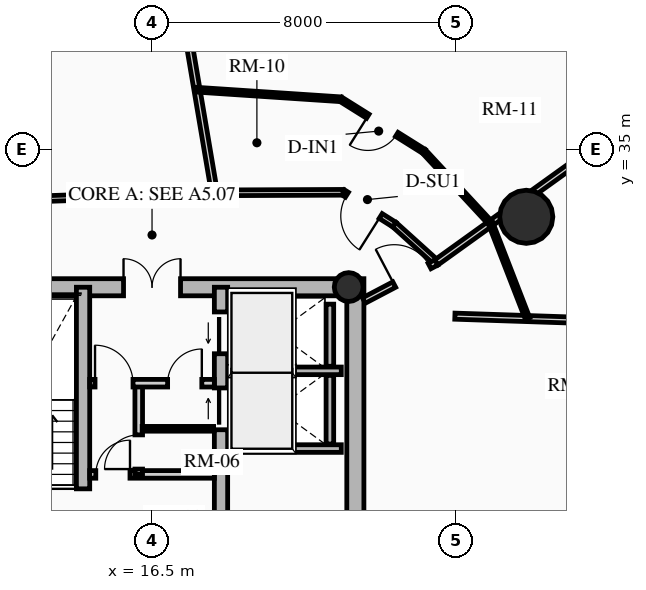
"""IFC4 building model, lengths in metres.
Left out: names, types, materials, properties, quantities, classifications, styles, units other than length and angle.
Written with IfcOpenShell. Run it as: python <this file> out.ifc"""

import sys

from ifc_helpers import new_model, si_unit, direction, frame, frame_2d, origin, origin_2d, place, context, subcontext, project, spatial, rectangle, circle, hollow_circle, extrude, source, transform, mapped, element, fill, save


model = new_model("IFC4")
c1 = context("Model", 3, precision=1e-05, world=origin(), true_north=direction((0.0, 1.0)))
c2 = subcontext(c1, "Body", "Model", "MODEL_VIEW")
j1 = project(units=[si_unit("LENGTHUNIT", "METRE"), si_unit("PLANEANGLEUNIT", "RADIAN")], contexts=[c1])
p1 = place(None, origin())
s1 = spatial("IfcSite", under=j1, at=p1, CompositionType="ELEMENT")
p2 = place(p1, origin())
s2 = spatial("IfcBuilding", under=s1, at=p2, CompositionType="ELEMENT")
p3 = place(p2, frame((0.0, 0.0, 110.89)))
s3 = spatial("IfcBuildingStorey", under=s2, at=p3, CompositionType="ELEMENT", Elevation=110.89)
p4 = place(p3, frame((21.85, 17.4, 0.0), z_axis=(0.0, 0.0, 1.0), x_axis=(0.0, 1.0, 0.0)))
e1 = element("IfcWall", 1, at=p4, inside=s3, PredefinedType="SHEAR", context=c2, shape_type="SweptSolid", body=[
    extrude(rectangle(XDim=14.2, YDim=0.45, at=frame_2d((7.1, 0.0))), origin(), (0.0, 0.0, 1.0), 2.91),
])
p5 = place(p3, frame((11.15, 31.375, 0.0), z_axis=(0.0, 0.0, 1.0), x_axis=(1.0, 0.0, 0.0)))
e2 = element("IfcWall", 2, at=p5, inside=s3, PredefinedType="SHEAR", context=c2, shape_type="SweptSolid", body=[
    extrude(rectangle(XDim=10.7, YDim=0.45, at=frame_2d((5.35, 0.0))), origin(), (0.0, 0.0, 1.0), 2.91),
])
m1 = source(origin(), c2, "Body", "SweptSolid", [
    extrude(rectangle(XDim=1.5, YDim=2.02, at=frame_2d((0.75, 1.01))), frame((0.0, 0.235, 0.0), z_axis=(0.0, -1.0, 0.0), x_axis=(1.0, 0.0, 0.0)), (0.0, 0.0, 1.0), 0.47),
])
p6 = place(p5, frame((4.6, 0.0, 0.0)))
e3 = element("IfcOpeningElement", 3, at=p6, cuts=e2, PredefinedType="OPENING", context=c2, shape_type="MappedRepresentation", body=[
    mapped(m1, transform((0.0, 0.0, 0.0), x_axis=(1.0, 0.0, 0.0), y_axis=(0.0, 1.0, 0.0), z_axis=(0.0, 0.0, 1.0), scale=1.0)),
])
p7 = place(p3, frame((14.685, 17.625, 0.0), z_axis=(0.0, 0.0, 1.0), x_axis=(0.0, 1.0, 0.0)))
e4 = element("IfcWall", 4, at=p7, inside=s3, PredefinedType="SHEAR", context=c2, shape_type="SweptSolid", body=[
    extrude(rectangle(XDim=13.75, YDim=0.35, at=frame_2d((6.875, 0.0))), origin(), (0.0, 0.0, 1.0), 2.91),
])
m2 = source(origin(), c2, "Body", "SweptSolid", [
    extrude(rectangle(XDim=1.1, YDim=2.015, at=frame_2d((0.55, 1.007))), frame((0.0, 0.185, 0.0), z_axis=(0.0, -1.0, 0.0), x_axis=(1.0, 0.0, 0.0)), (0.0, 0.0, 1.0), 0.37),
])
p8 = place(p7, frame((4.875, 0.0, 0.0)))
e5 = element("IfcOpeningElement", 5, at=p8, cuts=e4, PredefinedType="OPENING", context=c2, shape_type="MappedRepresentation", body=[
    mapped(m2, transform((0.0, 0.0, 0.0), x_axis=(1.0, 0.0, 0.0), y_axis=(0.0, 1.0, 0.0), z_axis=(0.0, 0.0, 1.0), scale=1.0)),
])
m3 = source(origin(), c2, "Body", "SweptSolid", [
    extrude(rectangle(XDim=1.15, YDim=2.02, at=frame_2d((0.575, 1.01))), frame((0.0, 0.185, 0.0), z_axis=(0.0, -1.0, 0.0), x_axis=(1.0, 0.0, 0.0)), (0.0, 0.0, 1.0), 0.37),
])
p9 = place(p7, frame((7.295, 0.0, 0.0)))
e6 = element("IfcOpeningElement", 6, at=p9, cuts=e4, PredefinedType="OPENING", context=c2, shape_type="MappedRepresentation", body=[
    mapped(m3, transform((0.0, 0.0, 0.0), x_axis=(1.0, 0.0, 0.0), y_axis=(0.0, 1.0, 0.0), z_axis=(0.0, 0.0, 1.0), scale=1.0)),
])
p10 = place(p3, frame((18.315, 17.625, 0.0), z_axis=(0.0, 0.0, 1.0), x_axis=(0.0, 1.0, 0.0)))
e7 = element("IfcWall", 7, at=p10, inside=s3, PredefinedType="SHEAR", context=c2, shape_type="SweptSolid", body=[
    extrude(rectangle(XDim=13.75, YDim=0.35, at=frame_2d((6.875, 0.0))), origin(), (0.0, 0.0, 1.0), 2.91),
])
p11 = place(p10, frame((10.0, 0.0, 0.0)))
e8 = element("IfcOpeningElement", 8, at=p11, cuts=e7, PredefinedType="OPENING", context=c2, shape_type="MappedRepresentation", body=[
    mapped(m2, transform((0.0, 0.0, 0.0), x_axis=(1.0, 0.0, 0.0), y_axis=(0.0, 1.0, 0.0), z_axis=(0.0, 0.0, 1.0), scale=1.0)),
])
p12 = place(p10, frame((12.0, 0.0, 0.0)))
e9 = element("IfcOpeningElement", 9, at=p12, cuts=e7, PredefinedType="OPENING", context=c2, shape_type="MappedRepresentation", body=[
    mapped(m2, transform((0.0, 0.0, 0.0), x_axis=(1.0, 0.0, 0.0), y_axis=(0.0, 1.0, 0.0), z_axis=(0.0, 0.0, 1.0), scale=1.0)),
])
p13 = place(p10, frame((5.305, 0.0, 0.0)))
e10 = element("IfcOpeningElement", 10, at=p13, cuts=e7, PredefinedType="OPENING", context=c2, shape_type="MappedRepresentation", body=[
    mapped(m3, transform((0.0, 0.0, 0.0), x_axis=(1.0, 0.0, 0.0), y_axis=(0.0, 1.0, 0.0), z_axis=(0.0, 0.0, 1.0), scale=1.0)),
])
p14 = place(p3, frame((21.675, 31.38, 0.0), z_axis=(0.0, 0.0, 1.0), x_axis=(1.0, 0.0, 0.0)))
e11 = element("IfcColumn", 11, at=p14, inside=s3, PredefinedType="COLUMN", context=c2, shape_type="SweptSolid", body=[
    extrude(hollow_circle(Radius=0.38, WallThickness=0.032, at=origin_2d()), origin(), (0.0, 0.0, 1.0), 2.91),
])
p15 = place(p3, frame((26.347, 33.229, 0.0), z_axis=(0.0, 0.0, 1.0), x_axis=(1.0, 0.0, 0.0)))
e12 = element("IfcColumn", 12, at=p15, inside=s3, PredefinedType="USERDEFINED", context=c2, shape_type="SweptSolid", body=[
    extrude(circle(Radius=0.7, at=origin_2d()), origin(), (0.0, 0.0, 1.0), 2.91),
])
p16 = place(p3, frame((25.658, 39.928, 0.0), z_axis=(0.0, 0.0, 1.0), x_axis=(0.632700781152, -0.77439635945, 0.0)))
e13 = element("IfcWall", 13, at=p16, inside=s3, PredefinedType="SOLIDWALL", context=c2, shape_type="SweptSolid", body=[
    extrude(rectangle(XDim=5.448, YDim=0.24, at=frame_2d((2.724, 0.0))), origin(), (0.0, 0.0, 1.0), 2.179),
])
m4 = source(origin(), c2, "Body", "SweptSolid", [
    extrude(rectangle(XDim=1.9, YDim=1.35, at=frame_2d((0.95, 0.675))), frame((0.0, 0.13, 0.0), z_axis=(0.0, -1.0, 0.0), x_axis=(1.0, 0.0, 0.0)), (0.0, 0.0, 1.0), 0.26),
])
p17 = place(p16, frame((1.774, 0.0, 0.65)))
e14 = element("IfcOpeningElement", 14, at=p17, cuts=e13, PredefinedType="OPENING", context=c2, shape_type="MappedRepresentation", body=[
    mapped(m4, transform((0.0, 0.0, 0.0), x_axis=(1.0, 0.0, 0.0), y_axis=(0.0, 1.0, 0.0), z_axis=(0.0, 0.0, 1.0), scale=1.0)),
])
for number, where, z_axis, x_axis in (
    (15, (18.51, 27.13, 0.0), (0.0, 0.0, 1.0), (1.0, 0.0, 0.0)),
    (16, (18.51, 29.175, 0.0), (0.0, 0.0, 1.0), (1.0, 0.0, 0.0)),
):
    element("IfcWall", number, at=place(p3, frame(where, z_axis=z_axis, x_axis=x_axis)), inside=s3, PredefinedType="SHEAR", context=c2, shape_type="SweptSolid", body=[
        extrude(rectangle(XDim=2.97, YDim=0.2, at=frame_2d((1.485, 0.0))), origin(), (0.0, 0.0, 1.0), 2.91),
    ])
p18 = place(p3, frame((21.18, 27.25, 0.0), z_axis=(0.0, 0.0, 1.0), x_axis=(0.0, 1.0, 0.0)))
e17 = element("IfcWall", 17, at=p18, inside=s3, PredefinedType="SHEAR", context=c2, shape_type="SweptSolid", body=[
    extrude(rectangle(XDim=1.805, YDim=0.2, at=frame_2d((0.902, 0.0))), origin(), (0.0, 0.0, 1.0), 2.91),
])
p19 = place(p3, frame((21.18, 29.295, 0.0), z_axis=(0.0, 0.0, 1.0), x_axis=(0.0, 1.0, 0.0)))
e18 = element("IfcWall", 18, at=p19, inside=s3, PredefinedType="SHEAR", context=c2, shape_type="SweptSolid", body=[
    extrude(rectangle(XDim=1.635, YDim=0.2, at=frame_2d((0.817, 0.0))), origin(), (0.0, 0.0, 1.0), 2.91),
])
p20 = place(p3, frame((14.86, 26.45, 0.0), z_axis=(0.0, 0.0, 1.0), x_axis=(1.0, 0.0, 0.0)))
e19 = element("IfcWall", 19, at=p20, inside=s3, PredefinedType="PARTITIONING", context=c2, shape_type="SweptSolid", body=[
    extrude(rectangle(XDim=3.28, YDim=0.2, at=frame_2d((1.64, 0.0))), origin(), (0.0, 0.0, 1.0), 2.655),
])
m5 = source(origin(), c2, "Body", "SweptSolid", [
    extrude(rectangle(XDim=0.9, YDim=2.005, at=frame_2d((0.45, 1.002))), frame((0.0, 0.11, 0.0), z_axis=(0.0, -1.0, 0.0), x_axis=(1.0, 0.0, 0.0)), (0.0, 0.0, 1.0), 0.22),
])
p21 = place(p20, frame((0.16, 0.0, 0.0)))
e20 = element("IfcOpeningElement", 20, at=p21, cuts=e19, PredefinedType="OPENING", context=c2, shape_type="MappedRepresentation", body=[
    mapped(m5, transform((0.0, 0.0, 0.0), x_axis=(1.0, 0.0, 0.0), y_axis=(0.0, 1.0, 0.0), z_axis=(0.0, 0.0, 1.0), scale=1.0)),
])
p22 = place(p3, frame((16.15, 26.45, 0.0), z_axis=(0.0, 0.0, 1.0), x_axis=(0.0, 1.0, 0.0)))
e21 = element("IfcWall", 21, at=p22, inside=s3, PredefinedType="PARTITIONING", context=c2, shape_type="SweptSolid", body=[
    extrude(rectangle(XDim=2.4, YDim=0.2, at=frame_2d((1.2, 0.0))), origin(), (0.0, 0.0, 1.0), 2.655),
])
p23 = place(p22, frame((0.14, 0.0, 0.0)))
e22 = element("IfcOpeningElement", 22, at=p23, cuts=e21, PredefinedType="OPENING", context=c2, shape_type="MappedRepresentation", body=[
    mapped(m5, transform((0.0, 0.0, 0.0), x_axis=(1.0, 0.0, 0.0), y_axis=(0.0, 1.0, 0.0), z_axis=(0.0, 0.0, 1.0), scale=1.0)),
])
p24 = place(p3, frame((14.86, 28.85, 0.0), z_axis=(0.0, 0.0, 1.0), x_axis=(1.0, 0.0, 0.0)))
e23 = element("IfcWall", 23, at=p24, inside=s3, PredefinedType="PARTITIONING", context=c2, shape_type="SweptSolid", body=[
    extrude(rectangle(XDim=3.28, YDim=0.2, at=frame_2d((1.64, 0.0))), origin(), (0.0, 0.0, 1.0), 2.655),
])
m6 = source(origin(), c2, "Body", "SweptSolid", [
    extrude(rectangle(XDim=1.0, YDim=2.015, at=frame_2d((0.5, 1.007))), frame((0.0, 0.11, 0.0), z_axis=(0.0, -1.0, 0.0), x_axis=(1.0, 0.0, 0.0)), (0.0, 0.0, 1.0), 0.22),
])
p25 = place(p24, frame((0.14, 0.0, 0.0)))
e24 = element("IfcOpeningElement", 24, at=p25, cuts=e23, PredefinedType="OPENING", context=c2, shape_type="MappedRepresentation", body=[
    mapped(m6, transform((0.0, 0.0, 0.0), x_axis=(1.0, 0.0, 0.0), y_axis=(0.0, 1.0, 0.0), z_axis=(0.0, 0.0, 1.0), scale=1.0)),
])
p26 = place(p24, frame((2.05, 0.0, 0.0)))
e25 = element("IfcOpeningElement", 25, at=p26, cuts=e23, PredefinedType="OPENING", context=c2, shape_type="MappedRepresentation", body=[
    mapped(m5, transform((0.0, 0.0, 0.0), x_axis=(1.0, 0.0, 0.0), y_axis=(0.0, 1.0, 0.0), z_axis=(0.0, 0.0, 1.0), scale=1.0)),
])
p27 = place(p3, frame((16.24, 27.65, 0.0), z_axis=(0.0, 0.0, 1.0), x_axis=(1.0, 0.0, 0.0)))
e26 = element("IfcWall", 26, at=p27, inside=s3, PredefinedType="PARTITIONING", context=c2, shape_type="SweptSolid", body=[
    extrude(rectangle(XDim=1.88, YDim=0.125, at=frame_2d((0.94, 0.0))), origin(), (0.0, 0.0, 1.0), 2.655),
])
p28 = place(p3, frame((23.98, 32.027, 0.0), z_axis=(0.0, 0.0, 1.0), x_axis=(-0.742353224332, 0.670008724065, 0.0)))
e27 = element("IfcWall", 27, at=p28, inside=s3, PredefinedType="PARTITIONING", context=c2, shape_type="SweptSolid", body=[
    extrude(rectangle(XDim=1.485, YDim=0.15, at=frame_2d((0.742, 0.0))), origin(), (0.0, 0.0, 1.0), 2.225),
])
p29 = place(p3, frame((22.877, 33.022, 0.0), z_axis=(0.0, 0.0, 1.0), x_axis=(-0.845895608855, 0.533348496689, 0.0)))
e28 = element("IfcWall", 28, at=p29, inside=s3, PredefinedType="PARTITIONING", context=c2, shape_type="SweptSolid", body=[
    extrude(rectangle(XDim=1.597, YDim=0.15, at=frame_2d((0.798, 0.0))), origin(), (0.0, 0.0, 1.0), 2.225),
])
m7 = source(origin(), c2, "Body", "SweptSolid", [
    extrude(rectangle(XDim=1.05, YDim=2.015, at=frame_2d((0.525, 1.007))), frame((0.0, 0.085, 0.0), z_axis=(0.0, -1.0, 0.0), x_axis=(1.0, 0.0, 0.0)), (0.0, 0.0, 1.0), 0.17),
])
p30 = place(p29, frame((0.427, 0.0, 0.0)))
e29 = element("IfcOpeningElement", 29, at=p30, cuts=e28, PredefinedType="OPENING", context=c2, shape_type="MappedRepresentation", body=[
    mapped(m7, transform((0.0, 0.0, 0.0), x_axis=(1.0, 0.0, 0.0), y_axis=(0.0, 1.0, 0.0), z_axis=(0.0, 0.0, 1.0), scale=1.0)),
])
p31 = place(p3, frame((21.527, 33.873, 0.0), z_axis=(0.0, 0.0, 1.0), x_axis=(-0.999991838845, -0.004040079574, 0.0)))
e30 = element("IfcWall", 30, at=p31, inside=s3, PredefinedType="PARTITIONING", context=c2, shape_type="SweptSolid", body=[
    extrude(rectangle(XDim=3.384, YDim=0.15, at=frame_2d((1.692, 0.0))), origin(), (0.0, 0.0, 1.0), 2.225),
])
p32 = place(p3, frame((18.143, 33.86, 0.0), z_axis=(0.0, 0.0, 1.0), x_axis=(-0.999419208319, -0.034077060363, 0.0)))
e31 = element("IfcWall", 31, at=p32, inside=s3, PredefinedType="PARTITIONING", context=c2, shape_type="SweptSolid", body=[
    extrude(rectangle(XDim=6.527, YDim=0.15, at=frame_2d((3.263, 0.0))), origin(), (0.0, 0.0, 1.0), 2.225),
])
p33 = place(p3, frame((24.469, 30.614, 0.0), z_axis=(0.0, 0.0, 1.0), x_axis=(0.999446768925, -0.033258924898, 0.0)))
e32 = element("IfcWall", 32, at=p33, inside=s3, PredefinedType="PARTITIONING", context=c2, shape_type="SweptSolid", body=[
    extrude(rectangle(XDim=6.834, YDim=0.16, at=frame_2d((3.417, 0.0))), origin(), (0.0, 0.0, 1.0), 2.179),
])
p34 = place(p3, frame((23.98, 32.027, 0.0), z_axis=(0.0, 0.0, 1.0), x_axis=(0.812162479031, 0.58343132214, 0.0)))
e33 = element("IfcWall", 33, at=p34, inside=s3, PredefinedType="PARTITIONING", context=c2, shape_type="SweptSolid", body=[
    extrude(rectangle(XDim=6.291, YDim=0.16, at=frame_2d((3.146, 0.0))), origin(), (0.0, 0.0, 1.0), 2.179),
])
p35 = place(p3, frame((18.143, 33.86, 0.0), z_axis=(0.0, 0.0, 1.0), x_axis=(-0.167145472003, 0.985932244725, 0.0)))
e34 = element("IfcWall", 34, at=p35, inside=s3, PredefinedType="PARTITIONING", context=c2, shape_type="SweptSolid", body=[
    extrude(rectangle(XDim=9.829, YDim=0.16, at=frame_2d((4.914, 0.0))), origin(), (0.0, 0.0, 1.0), 2.179),
])
p36 = place(p3, frame((22.075, 31.025, 0.0), z_axis=(0.0, 0.0, 1.0), x_axis=(0.885026466958, 0.465540710125, 0.0)))
e35 = element("IfcWall", 35, at=p36, inside=s3, PredefinedType="PARTITIONING", context=c2, shape_type="SweptSolid", body=[
    extrude(rectangle(XDim=2.152, YDim=0.16, at=frame_2d((1.076, 0.0))), origin(), (0.0, 0.0, 1.0), 2.225),
])
m8 = source(origin(), c2, "Body", "SweptSolid", [
    extrude(rectangle(XDim=1.05, YDim=2.015, at=frame_2d((0.525, 1.007))), frame((0.0, 0.09, 0.0), z_axis=(0.0, -1.0, 0.0), x_axis=(1.0, 0.0, 0.0)), (0.0, 0.0, 1.0), 0.18),
])
p37 = place(p36, frame((0.902, 0.0, 0.0)))
e36 = element("IfcOpeningElement", 36, at=p37, cuts=e35, PredefinedType="OPENING", context=c2, shape_type="MappedRepresentation", body=[
    mapped(m8, transform((0.0, 0.0, 0.0), x_axis=(1.0, 0.0, 0.0), y_axis=(0.0, 1.0, 0.0), z_axis=(0.0, 0.0, 1.0), scale=1.0)),
])
p38 = place(p3, frame((26.382, 30.551, 0.0), z_axis=(0.0, 0.0, 1.0), x_axis=(-0.361621391028, 0.932325034283, 0.0)))
e37 = element("IfcWall", 37, at=p38, inside=s3, PredefinedType="PARTITIONING", context=c2, shape_type="SweptSolid", body=[
    extrude(rectangle(XDim=2.686, YDim=0.125, at=frame_2d((1.343, 0.0))), origin(), (0.0, 0.0, 1.0), 2.225),
])
p39 = place(p3, frame((25.41, 33.054, 0.0), z_axis=(0.0, 0.0, 1.0), x_axis=(-0.679733694606, 0.73345899982, 0.0)))
e38 = element("IfcWall", 38, at=p39, inside=s3, PredefinedType="PARTITIONING", context=c2, shape_type="SweptSolid", body=[
    extrude(rectangle(XDim=2.586, YDim=0.125, at=frame_2d((1.293, 0.0))), origin(), (0.0, 0.0, 1.0), 2.655),
])
p40 = place(p3, frame((23.653, 34.951, 0.0), z_axis=(0.0, 0.0, 1.0), x_axis=(-0.847306782665, 0.531103771452, 0.0)))
e39 = element("IfcWall", 39, at=p40, inside=s3, PredefinedType="PARTITIONING", context=c2, shape_type="SweptSolid", body=[
    extrude(rectangle(XDim=2.581, YDim=0.125, at=frame_2d((1.291, 0.0))), origin(), (0.0, 0.0, 1.0), 2.225),
])
m9 = source(origin(), c2, "Body", "SweptSolid", [
    extrude(rectangle(XDim=0.9, YDim=2.005, at=frame_2d((0.45, 1.002))), frame((0.0, 0.073, 0.0), z_axis=(0.0, -1.0, 0.0), x_axis=(1.0, 0.0, 0.0)), (0.0, 0.0, 1.0), 0.145),
])
p41 = place(p40, frame((0.841, 0.0, 0.0)))
e40 = element("IfcOpeningElement", 40, at=p41, cuts=e39, PredefinedType="OPENING", context=c2, shape_type="MappedRepresentation", body=[
    mapped(m9, transform((0.0, 0.0, 0.0), x_axis=(1.0, 0.0, 0.0), y_axis=(0.0, 1.0, 0.0), z_axis=(0.0, 0.0, 1.0), scale=1.0)),
])
p42 = place(p3, frame((21.466, 36.322, 0.0), z_axis=(0.0, 0.0, 1.0), x_axis=(-0.997806476515, 0.066198454847, 0.0)))
e41 = element("IfcWall", 41, at=p42, inside=s3, PredefinedType="PARTITIONING", context=c2, shape_type="SweptSolid", body=[
    extrude(rectangle(XDim=3.791, YDim=0.125, at=frame_2d((1.896, 0.0))), origin(), (0.0, 0.0, 1.0), 2.225),
])
m10 = source(origin(), c2, "Body", "SweptSolid", [
    extrude(rectangle(XDim=1.9, YDim=1.35, at=frame_2d((0.95, 0.675))), frame((0.0, 0.03, 0.0), z_axis=(0.0, -1.0, 0.0), x_axis=(1.0, 0.0, 0.0)), (0.0, 0.0, 1.0), 0.06),
])
p43 = place(p17, origin())
e42 = element("IfcWindow", 42, at=p43, inside=s3, PartitioningType="DOUBLE_PANEL_VERTICAL", PredefinedType="WINDOW", context=c2, shape_type="MappedRepresentation", body=[
    mapped(m10, transform((0.0, 0.0, 0.0), x_axis=(1.0, 0.0, 0.0), y_axis=(0.0, 1.0, 0.0), z_axis=(0.0, 0.0, 1.0), scale=1.0)),
])
fill(e14, e42)
m11 = source(origin(), c2, "Body", "SweptSolid", [
    extrude(rectangle(XDim=1.1, YDim=2.015, at=frame_2d((0.55, 1.007))), frame((0.0, 0.025, 0.0), z_axis=(0.0, -1.0, 0.0), x_axis=(1.0, 0.0, 0.0)), (0.0, 0.0, 1.0), 0.05),
])
p44 = place(p11, origin())
e43 = element("IfcDoor", 43, at=p44, inside=s3, OperationType="SLIDING_TO_RIGHT", PredefinedType="DOOR", context=c2, shape_type="MappedRepresentation", body=[
    mapped(m11, transform((0.0, 0.0, 0.0), x_axis=(1.0, 0.0, 0.0), y_axis=(0.0, 1.0, 0.0), z_axis=(0.0, 0.0, 1.0), scale=1.0)),
])
fill(e8, e43)
p45 = place(p12, origin())
e44 = element("IfcDoor", 44, at=p45, inside=s3, OperationType="SLIDING_TO_LEFT", PredefinedType="DOOR", context=c2, shape_type="MappedRepresentation", body=[
    mapped(m11, transform((0.0, 0.0, 0.0), x_axis=(1.0, 0.0, 0.0), y_axis=(0.0, 1.0, 0.0), z_axis=(0.0, 0.0, 1.0), scale=1.0)),
])
fill(e9, e44)
m12 = source(origin(), c2, "Body", "SweptSolid", [
    extrude(rectangle(XDim=1.15, YDim=2.02, at=frame_2d((0.575, 1.01))), frame((0.0, 0.025, 0.0), z_axis=(0.0, -1.0, 0.0), x_axis=(1.0, 0.0, 0.0)), (0.0, 0.0, 1.0), 0.05),
])
p46 = place(p9, origin())
e45 = element("IfcDoor", 45, at=p46, inside=s3, OperationType="SINGLE_SWING_RIGHT", PredefinedType="DOOR", context=c2, shape_type="MappedRepresentation", body=[
    mapped(m12, transform((0.0, 0.0, 0.0), x_axis=(1.0, 0.0, 0.0), y_axis=(0.0, 1.0, 0.0), z_axis=(0.0, 0.0, 1.0), scale=1.0)),
])
fill(e6, e45)
m13 = source(origin(), c2, "Body", "SweptSolid", [
    extrude(rectangle(XDim=1.5, YDim=2.02, at=frame_2d((0.75, 1.01))), frame((0.0, 0.025, 0.0), z_axis=(0.0, -1.0, 0.0), x_axis=(1.0, 0.0, 0.0)), (0.0, 0.0, 1.0), 0.05),
])
p47 = place(p6, origin())
e46 = element("IfcDoor", 46, at=p47, inside=s3, OperationType="DOUBLE_DOOR_SINGLE_SWING", PredefinedType="DOOR", context=c2, shape_type="MappedRepresentation", body=[
    mapped(m13, transform((0.0, 0.0, 0.0), x_axis=(1.0, 0.0, 0.0), y_axis=(0.0, 1.0, 0.0), z_axis=(0.0, 0.0, 1.0), scale=1.0)),
])
fill(e3, e46)
m14 = source(origin(), c2, "Body", "SweptSolid", [
    extrude(rectangle(XDim=0.9, YDim=2.005, at=frame_2d((0.45, 1.002))), frame((0.0, 0.025, 0.0), z_axis=(0.0, -1.0, 0.0), x_axis=(1.0, 0.0, 0.0)), (0.0, 0.0, 1.0), 0.05),
])
p48 = place(p21, origin())
e47 = element("IfcDoor", 47, at=p48, inside=s3, OperationType="SINGLE_SWING_RIGHT", PredefinedType="DOOR", context=c2, shape_type="MappedRepresentation", body=[
    mapped(m14, transform((0.0, 0.0, 0.0), x_axis=(1.0, 0.0, 0.0), y_axis=(0.0, 1.0, 0.0), z_axis=(0.0, 0.0, 1.0), scale=1.0)),
])
fill(e20, e47)
m15 = source(origin(), c2, "Body", "SweptSolid", [
    extrude(rectangle(XDim=1.0, YDim=2.015, at=frame_2d((0.5, 1.007))), frame((0.0, 0.025, 0.0), z_axis=(0.0, -1.0, 0.0), x_axis=(1.0, 0.0, 0.0)), (0.0, 0.0, 1.0), 0.05),
])
p49 = place(p25, origin())
e48 = element("IfcDoor", 48, at=p49, inside=s3, OperationType="SINGLE_SWING_LEFT", PredefinedType="DOOR", context=c2, shape_type="MappedRepresentation", body=[
    mapped(m15, transform((0.0, 0.0, 0.0), x_axis=(1.0, 0.0, 0.0), y_axis=(0.0, 1.0, 0.0), z_axis=(0.0, 0.0, 1.0), scale=1.0)),
])
fill(e24, e48)
p50 = place(p23, origin())
e49 = element("IfcDoor", 49, at=p50, inside=s3, OperationType="SINGLE_SWING_LEFT", PredefinedType="DOOR", context=c2, shape_type="MappedRepresentation", body=[
    mapped(m14, transform((0.0, 0.0, 0.0), x_axis=(1.0, 0.0, 0.0), y_axis=(0.0, 1.0, 0.0), z_axis=(0.0, 0.0, 1.0), scale=1.0)),
])
fill(e22, e49)
p51 = place(p26, origin())
e50 = element("IfcDoor", 50, at=p51, inside=s3, OperationType="SINGLE_SWING_RIGHT", PredefinedType="DOOR", context=c2, shape_type="MappedRepresentation", body=[
    mapped(m14, transform((0.0, 0.0, 0.0), x_axis=(1.0, 0.0, 0.0), y_axis=(0.0, 1.0, 0.0), z_axis=(0.0, 0.0, 1.0), scale=1.0)),
])
fill(e25, e50)
m16 = source(origin(), c2, "Body", "SweptSolid", [
    extrude(rectangle(XDim=1.05, YDim=2.015, at=frame_2d((0.525, 1.007))), frame((0.0, 0.025, 0.0), z_axis=(0.0, -1.0, 0.0), x_axis=(1.0, 0.0, 0.0)), (0.0, 0.0, 1.0), 0.05),
])
p52 = place(p37, origin())
e51 = element("IfcDoor", 51, at=p52, inside=s3, OperationType="SINGLE_SWING_LEFT", PredefinedType="DOOR", context=c2, shape_type="MappedRepresentation", body=[
    mapped(m16, transform((0.0, 0.0, 0.0), x_axis=(1.0, 0.0, 0.0), y_axis=(0.0, 1.0, 0.0), z_axis=(0.0, 0.0, 1.0), scale=1.0)),
])
fill(e36, e51)
p53 = place(p30, origin())
e52 = element("IfcDoor", 52, at=p53, inside=s3, OperationType="SINGLE_SWING_LEFT", PredefinedType="DOOR", context=c2, shape_type="MappedRepresentation", body=[
    mapped(m16, transform((0.0, 0.0, 0.0), x_axis=(1.0, 0.0, 0.0), y_axis=(0.0, 1.0, 0.0), z_axis=(0.0, 0.0, 1.0), scale=1.0)),
])
fill(e29, e52)
p54 = place(p41, origin())
e53 = element("IfcDoor", 53, at=p54, inside=s3, OperationType="SINGLE_SWING_RIGHT", PredefinedType="DOOR", context=c2, shape_type="MappedRepresentation", body=[
    mapped(m14, transform((0.0, 0.0, 0.0), x_axis=(1.0, 0.0, 0.0), y_axis=(0.0, 1.0, 0.0), z_axis=(0.0, 0.0, 1.0), scale=1.0)),
])
fill(e40, e53)
save(model, sys.argv[1])
